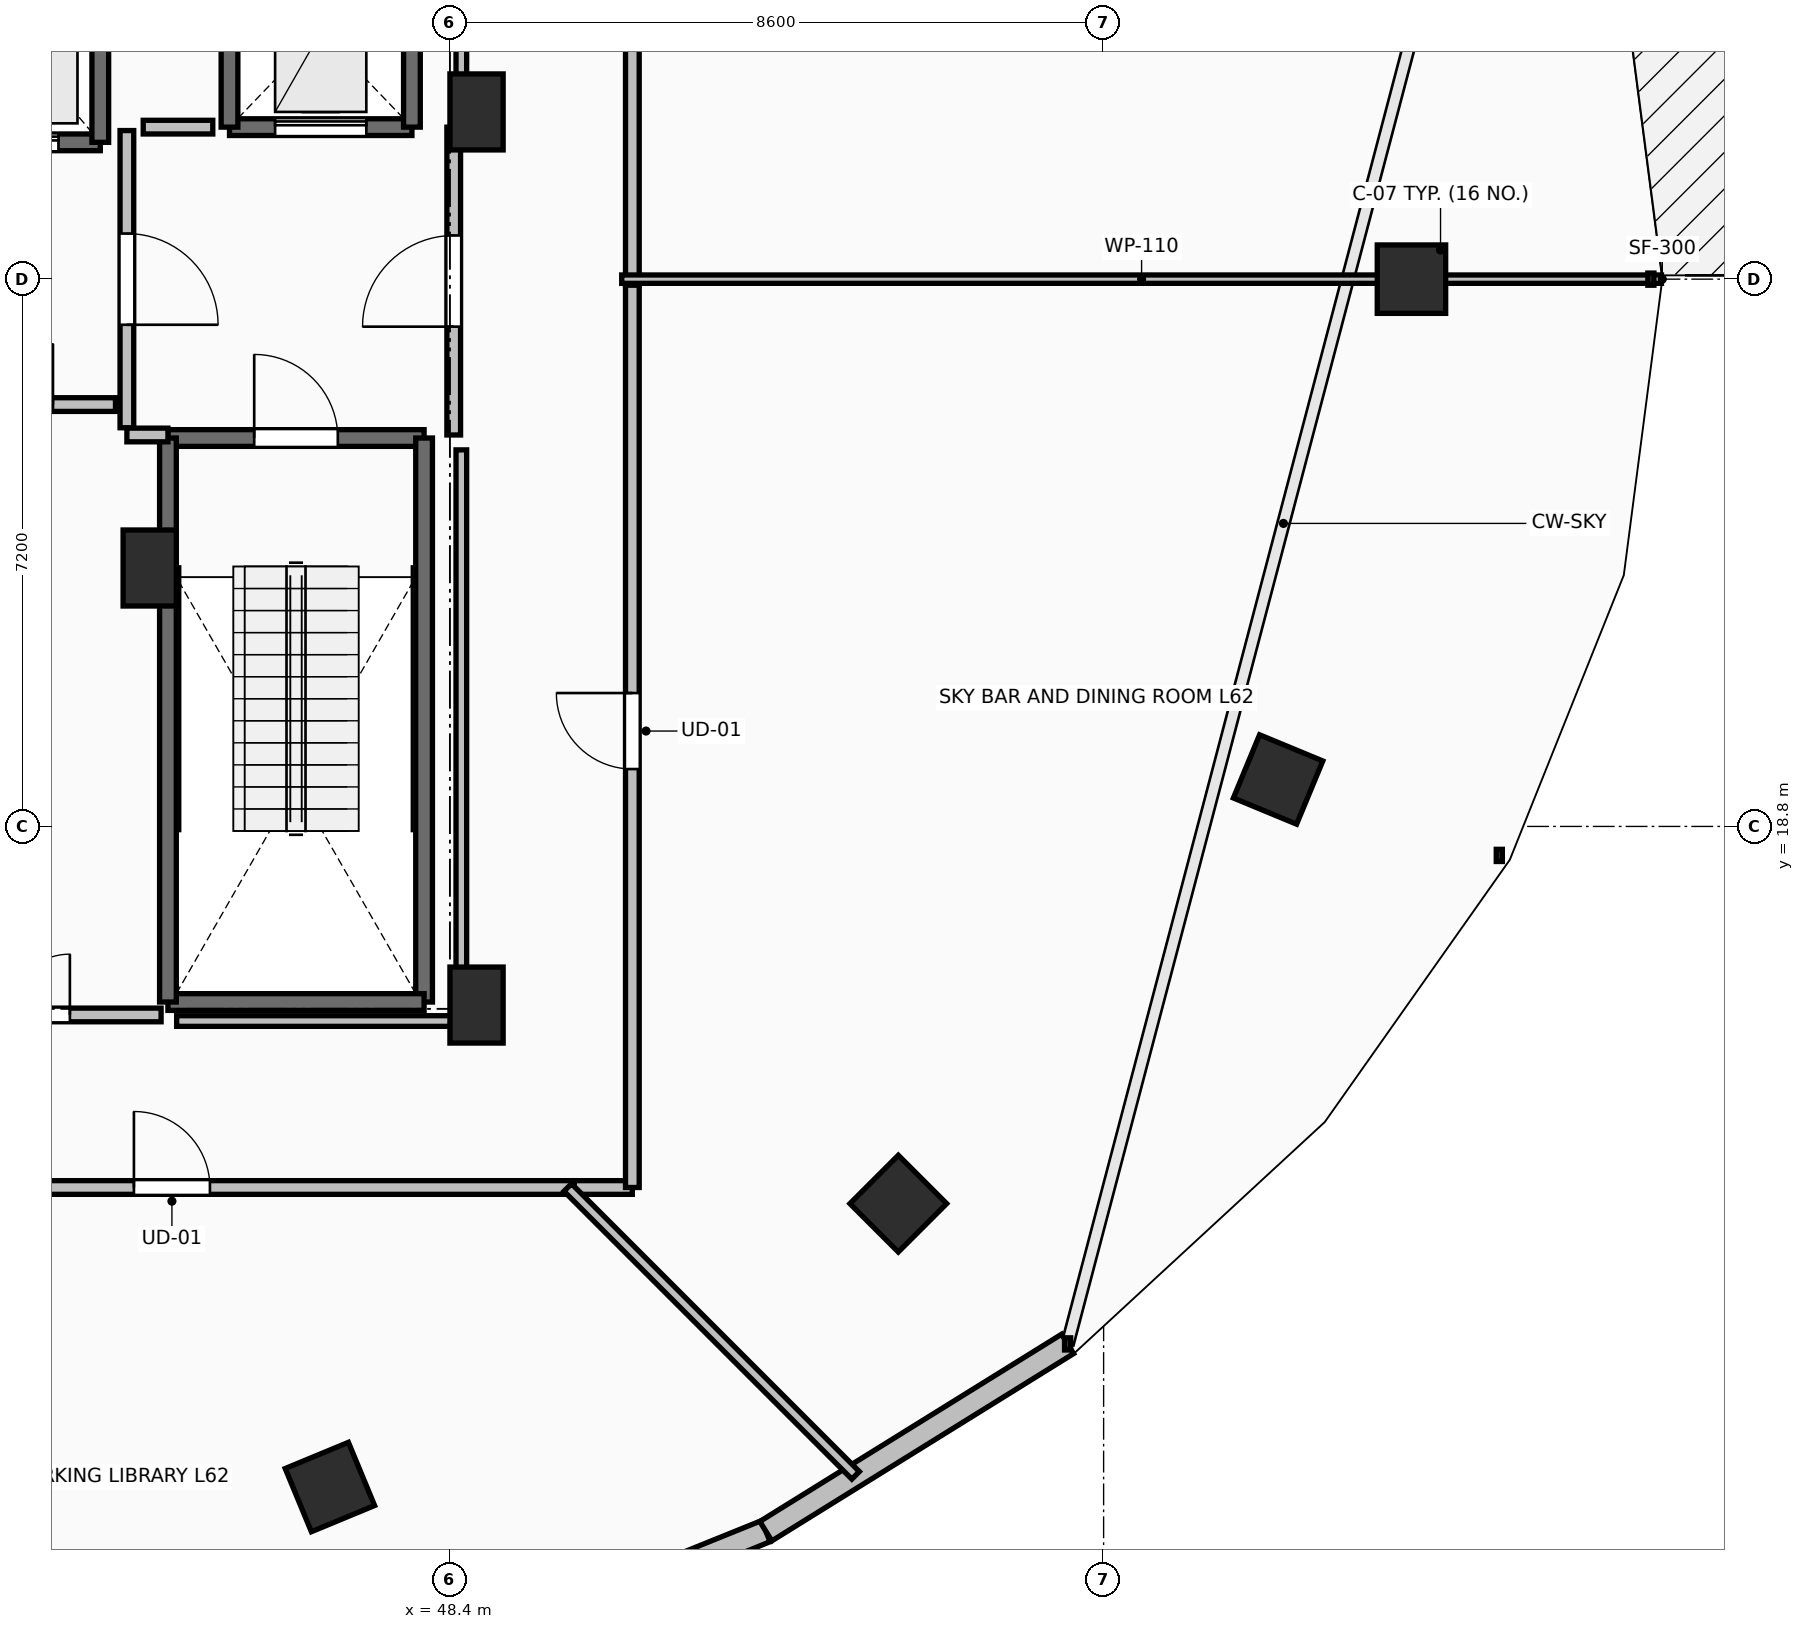
"""IFC4 building model, lengths in metres.
Left out: names, types, materials, properties, quantities, classifications, styles, units other than length and angle.
Written with IfcOpenShell. Run it as: python <this file> out.ifc"""

import sys

from ifc_helpers import new_model, si_unit, direction, frame, frame_2d, origin, origin_2d, place, context, subcontext, project, spatial, rectangle, extrude, element, fill, save


model = new_model("IFC4")
c1 = context("Model", 3, precision=1e-05, world=origin(), true_north=direction((0.0, 1.0)))
c2 = subcontext(c1, "Body", "Model", "MODEL_VIEW")
j1 = project(units=[si_unit("LENGTHUNIT", "METRE"), si_unit("PLANEANGLEUNIT", "RADIAN")], contexts=[c1])
p1 = place(None, origin())
s1 = spatial("IfcSite", under=j1, at=p1, CompositionType="ELEMENT")
p2 = place(p1, origin())
s2 = spatial("IfcBuilding", under=s1, at=p2, CompositionType="ELEMENT")
p3 = place(p2, frame((0.0, 0.0, 229.75)))
s3 = spatial("IfcBuildingStorey", under=s2, at=p3, CompositionType="ELEMENT", Elevation=229.75)
for number, where, z_axis, x_axis in (
    (1, (61.05, 26.0, 0.0), (0.0, 0.0, 1.0), (1.0, 0.0, 0.0)),
    (2, (46.821, 10.109, 0.0), (0.0, 0.0, 1.0), (0.383, -0.924, 0.0)),
    (3, (54.299, 13.838, 0.0), (0.0, 0.0, 1.0), (0.707, -0.707, 0.0)),
    (4, (59.295, 19.418, 0.0), (0.0, 0.0, 1.0), (0.924, -0.383, 0.0)),
):
    element("IfcColumn", number, at=place(p3, frame(where, z_axis=z_axis, x_axis=x_axis)), inside=s3, PredefinedType="COLUMN", context=c2, shape_type="SweptSolid", body=[
        extrude(rectangle(XDim=0.9, YDim=0.9, at=origin_2d()), origin(), (0.0, 0.0, 1.0), 4.5),
    ])
for number, where, z_axis, x_axis in (
    (5, (48.75, 28.2, 0.0), (0.0, 0.0, 1.0), (1.0, 0.0, 0.0)),
    (6, (48.75, 16.45, 0.0), (0.0, 0.0, 1.0), (1.0, 0.0, 0.0)),
    (7, (44.45, 22.2, 0.0), (0.0, 0.0, 1.0), (1.0, 0.0, 0.0)),
):
    element("IfcColumn", number, at=place(p3, frame(where, z_axis=z_axis, x_axis=x_axis)), inside=s3, PredefinedType="PILASTER", context=c2, shape_type="SweptSolid", body=[
        extrude(rectangle(XDim=0.7, YDim=1.0, at=origin_2d()), origin(), (0.0, 0.0, 1.0), 4.5),
    ])
p4 = place(p3, frame((48.026, 7.698, 0.0), z_axis=(0.0, 0.0, 1.0), x_axis=(0.927147375511, 0.374696869594, 0.0)))
e8 = element("IfcWall", 8, at=p4, inside=s3, PredefinedType="STANDARD", context=c2, shape_type="SweptSolid", body=[
    extrude(rectangle(XDim=4.885, YDim=0.3, at=frame_2d((2.443, 0.0))), origin(), (0.0, 0.0, 1.0), 4.24),
])
p5 = place(p3, frame((52.556, 9.529, 0.0), z_axis=(0.0, 0.0, 1.0), x_axis=(0.849702323036, 0.527262707032, 0.0)))
e9 = element("IfcWall", 9, at=p5, inside=s3, PredefinedType="STANDARD", context=c2, shape_type="SweptSolid", body=[
    extrude(rectangle(XDim=4.672, YDim=0.3, at=frame_2d((2.336, 0.0))), origin(), (0.0, 0.0, 1.0), 4.24),
])
p6 = place(p3, frame((44.69, 23.91, 0.0), z_axis=(0.0, 0.0, 1.0), x_axis=(1.0, 0.0, 0.0)))
e10 = element("IfcWall", 10, at=p6, inside=s3, PredefinedType="SOLIDWALL", context=c2, shape_type="SweptSolid", body=[
    extrude(rectangle(XDim=3.37, YDim=0.22, at=frame_2d((1.685, 0.0))), origin(), (0.0, 0.0, 1.0), 4.24),
])
p7 = place(p6, frame((1.135, 0.0, 0.0)))
e11 = element("IfcOpeningElement", 11, at=p7, cuts=e10, PredefinedType="OPENING", context=c2, shape_type="SweptSolid", body=[
    extrude(rectangle(XDim=1.1, YDim=2.15, at=frame_2d((0.55, 1.075))), frame((0.0, 0.125, 0.0), z_axis=(0.0, -1.0, 0.0), x_axis=(1.0, 0.0, 0.0)), (0.0, 0.0, 1.0), 0.25),
])
p8 = place(p3, frame((48.06, 23.91, 0.0), z_axis=(0.0, 0.0, 1.0), x_axis=(0.0, -1.0, 0.0)))
e12 = element("IfcWall", 12, at=p8, inside=s3, PredefinedType="SOLIDWALL", context=c2, shape_type="SweptSolid", body=[
    extrude(rectangle(XDim=7.42, YDim=0.22, at=frame_2d((3.71, 0.0))), origin(), (0.0, 0.0, 1.0), 4.24),
])
p9 = place(p3, frame((48.06, 16.49, 0.0), z_axis=(0.0, 0.0, 1.0), x_axis=(-1.0, 0.0, 0.0)))
e13 = element("IfcWall", 13, at=p9, inside=s3, PredefinedType="SOLIDWALL", context=c2, shape_type="SweptSolid", body=[
    extrude(rectangle(XDim=3.37, YDim=0.22, at=frame_2d((1.685, 0.0))), origin(), (0.0, 0.0, 1.0), 4.24),
])
p10 = place(p3, frame((44.69, 16.49, 0.0), z_axis=(0.0, 0.0, 1.0), x_axis=(0.0, 1.0, 0.0)))
e14 = element("IfcWall", 14, at=p10, inside=s3, PredefinedType="SOLIDWALL", context=c2, shape_type="SweptSolid", body=[
    extrude(rectangle(XDim=7.42, YDim=0.22, at=frame_2d((3.71, 0.0))), origin(), (0.0, 0.0, 1.0), 4.24),
])
p11 = place(p3, frame((41.6, 27.8, 0.0), z_axis=(0.0, 0.0, 1.0), x_axis=(1.0, 0.0, 0.0)))
e15 = element("IfcWall", 15, at=p11, inside=s3, PredefinedType="SOLIDWALL", context=c2, shape_type="SweptSolid", body=[
    extrude(rectangle(XDim=2.2, YDim=0.22, at=frame_2d((1.1, 0.0))), origin(), (0.0, 0.0, 1.0), 4.24),
])
p12 = place(p11, frame((0.55, 0.0, 0.0)))
e16 = element("IfcOpeningElement", 16, at=p12, cuts=e15, PredefinedType="OPENING", context=c2, shape_type="SweptSolid", body=[
    extrude(rectangle(XDim=1.1, YDim=2.2, at=frame_2d((0.55, 1.1))), frame((0.0, 0.125, 0.0), z_axis=(0.0, -1.0, 0.0), x_axis=(1.0, 0.0, 0.0)), (0.0, 0.0, 1.0), 0.25),
])
p13 = place(p3, frame((43.8, 27.8, 0.0), z_axis=(0.0, 0.0, 1.0), x_axis=(0.0, 1.0, 0.0)))
e17 = element("IfcWall", 17, at=p13, inside=s3, PredefinedType="SOLIDWALL", context=c2, shape_type="SweptSolid", body=[
    extrude(rectangle(XDim=2.6, YDim=0.22, at=frame_2d((1.3, 0.0))), origin(), (0.0, 0.0, 1.0), 4.24),
])
p14 = place(p3, frame((45.5, 28.0, 0.0), z_axis=(0.0, 0.0, 1.0), x_axis=(1.0, 0.0, 0.0)))
e18 = element("IfcWall", 18, at=p14, inside=s3, PredefinedType="SHEAR", context=c2, shape_type="SweptSolid", body=[
    extrude(rectangle(XDim=2.4, YDim=0.22, at=frame_2d((1.2, 0.0))), origin(), (0.0, 0.0, 1.0), 4.24),
])
p15 = place(p14, frame((0.6, 0.0, 0.0)))
e19 = element("IfcOpeningElement", 19, at=p15, cuts=e18, PredefinedType="OPENING", context=c2, shape_type="SweptSolid", body=[
    extrude(rectangle(XDim=1.2, YDim=2.2, at=frame_2d((0.6, 1.1))), frame((0.0, 0.125, 0.0), z_axis=(0.0, -1.0, 0.0), x_axis=(1.0, 0.0, 0.0)), (0.0, 0.0, 1.0), 0.25),
])
for number, where, z_axis, x_axis in (
    (20, (47.9, 28.0, 0.0), (0.0, 0.0, 1.0), (0.0, 1.0, 0.0)),
    (21, (45.5, 30.5, 0.0), (0.0, 0.0, 1.0), (0.0, -1.0, 0.0)),
):
    element("IfcWall", number, at=place(p3, frame(where, z_axis=z_axis, x_axis=x_axis)), inside=s3, PredefinedType="SHEAR", context=c2, shape_type="SweptSolid", body=[
        extrude(rectangle(XDim=2.5, YDim=0.22, at=frame_2d((1.25, 0.0))), origin(), (0.0, 0.0, 1.0), 4.24),
    ])
p16 = place(p3, frame((44.15, 27.955, 0.0), z_axis=(0.0, 0.0, 1.0), x_axis=(0.0, -1.0, 0.0)))
e22 = element("IfcWall", 22, at=p16, inside=s3, PredefinedType="PARTITIONING", context=c2, shape_type="SweptSolid", body=[
    extrude(rectangle(XDim=3.91, YDim=0.18, at=frame_2d((1.955, 0.0))), origin(), (0.0, 0.0, 1.0), 4.24),
])
p17 = place(p16, frame((1.355, 0.0, 0.0)))
e23 = element("IfcOpeningElement", 23, at=p17, cuts=e22, PredefinedType="OPENING", context=c2, shape_type="SweptSolid", body=[
    extrude(rectangle(XDim=1.2, YDim=2.15, at=frame_2d((0.6, 1.075))), frame((0.0, 0.105, 0.0), z_axis=(0.0, -1.0, 0.0), x_axis=(1.0, 0.0, 0.0)), (0.0, 0.0, 1.0), 0.21),
])
p18 = place(p3, frame((44.15, 23.95, 0.0), z_axis=(0.0, 0.0, 1.0), x_axis=(1.0, 0.0, 0.0)))
e24 = element("IfcWall", 24, at=p18, inside=s3, PredefinedType="PARTITIONING", context=c2, shape_type="SweptSolid", body=[
    extrude(rectangle(XDim=0.54, YDim=0.18, at=frame_2d((0.27, 0.0))), origin(), (0.0, 0.0, 1.0), 4.24),
])
p19 = place(p3, frame((48.45, 23.95, 0.0), z_axis=(0.0, 0.0, 1.0), x_axis=(0.0, 1.0, 0.0)))
e25 = element("IfcWall", 25, at=p19, inside=s3, PredefinedType="PARTITIONING", context=c2, shape_type="SweptSolid", body=[
    extrude(rectangle(XDim=4.05, YDim=0.18, at=frame_2d((2.025, 0.0))), origin(), (0.0, 0.0, 1.0), 4.24),
])
p20 = place(p19, frame((1.425, 0.0, 0.0)))
e26 = element("IfcOpeningElement", 26, at=p20, cuts=e25, PredefinedType="OPENING", context=c2, shape_type="SweptSolid", body=[
    extrude(rectangle(XDim=1.2, YDim=2.15, at=frame_2d((0.6, 1.075))), frame((0.0, 0.105, 0.0), z_axis=(0.0, -1.0, 0.0), x_axis=(1.0, 0.0, 0.0)), (0.0, 0.0, 1.0), 0.21),
])
p21 = place(p3, frame((41.555, 24.35, 0.0), z_axis=(0.0, 0.0, 1.0), x_axis=(1.0, 0.0, 0.0)))
e27 = element("IfcWall", 27, at=p21, inside=s3, PredefinedType="PARTITIONING", context=c2, shape_type="SweptSolid", body=[
    extrude(rectangle(XDim=2.445, YDim=0.18, at=frame_2d((1.223, 0.0))), origin(), (0.0, 0.0, 1.0), 4.24),
])
p22 = place(p21, frame((0.823, 0.0, 0.0)))
e28 = element("IfcOpeningElement", 28, at=p22, cuts=e27, PredefinedType="OPENING", context=c2, shape_type="SweptSolid", body=[
    extrude(rectangle(XDim=0.8, YDim=2.05, at=frame_2d((0.4, 1.025))), frame((0.0, 0.105, 0.0), z_axis=(0.0, -1.0, 0.0), x_axis=(1.0, 0.0, 0.0)), (0.0, 0.0, 1.0), 0.21),
])
p23 = place(p3, frame((41.4, 16.32, 0.0), z_axis=(0.0, 0.0, 1.0), x_axis=(1.0, 0.0, 0.0)))
e29 = element("IfcWall", 29, at=p23, inside=s3, PredefinedType="PARTITIONING", context=c2, shape_type="SweptSolid", body=[
    extrude(rectangle(XDim=3.2, YDim=0.18, at=frame_2d((1.6, 0.0))), origin(), (0.0, 0.0, 1.0), 4.24),
])
p24 = place(p23, frame((1.2, 0.0, 0.0)))
e30 = element("IfcOpeningElement", 30, at=p24, cuts=e29, PredefinedType="OPENING", context=c2, shape_type="SweptSolid", body=[
    extrude(rectangle(XDim=0.8, YDim=2.05, at=frame_2d((0.4, 1.025))), frame((0.0, 0.105, 0.0), z_axis=(0.0, -1.0, 0.0), x_axis=(1.0, 0.0, 0.0)), (0.0, 0.0, 1.0), 0.21),
])
p25 = place(p3, frame((39.45, 14.05, 0.0), z_axis=(0.0, 0.0, 1.0), x_axis=(1.0, 0.0, 0.0)))
e31 = element("IfcWall", 31, at=p25, inside=s3, PredefinedType="PARTITIONING", context=c2, shape_type="SweptSolid", body=[
    extrude(rectangle(XDim=10.585, YDim=0.18, at=frame_2d((5.292, 0.0))), origin(), (0.0, 0.0, 1.0), 3.432),
])
p26 = place(p25, frame((4.792, 0.0, 0.0)))
e32 = element("IfcOpeningElement", 32, at=p26, cuts=e31, PredefinedType="OPENING", context=c2, shape_type="SweptSolid", body=[
    extrude(rectangle(XDim=1.0, YDim=2.15, at=frame_2d((0.5, 1.075))), frame((0.0, 0.105, 0.0), z_axis=(0.0, -1.0, 0.0), x_axis=(1.0, 0.0, 0.0)), (0.0, 0.0, 1.0), 0.21),
])
p27 = place(p3, frame((50.035, 14.05, 0.0), z_axis=(0.0, 0.0, 1.0), x_axis=(1.0, 0.0, 0.0)))
e33 = element("IfcWall", 33, at=p27, inside=s3, PredefinedType="PARTITIONING", context=c2, shape_type="SweptSolid", body=[
    extrude(rectangle(XDim=0.765, YDim=0.18, at=frame_2d((0.383, 0.0))), origin(), (0.0, 0.0, 1.0), 3.886),
])
p28 = place(p3, frame((50.8, 14.05, 0.0), z_axis=(0.0, 0.0, 1.0), x_axis=(0.0, 1.0, 0.0)))
e34 = element("IfcWall", 34, at=p28, inside=s3, PredefinedType="PARTITIONING", context=c2, shape_type="SweptSolid", body=[
    extrude(rectangle(XDim=12.01, YDim=0.18, at=frame_2d((6.005, 0.0))), origin(), (0.0, 0.0, 1.0), 3.432),
])
p29 = place(p28, frame((5.505, 0.0, 0.0)))
e35 = element("IfcOpeningElement", 35, at=p29, cuts=e34, PredefinedType="OPENING", context=c2, shape_type="SweptSolid", body=[
    extrude(rectangle(XDim=1.0, YDim=2.15, at=frame_2d((0.5, 1.075))), frame((0.0, 0.105, 0.0), z_axis=(0.0, -1.0, 0.0), x_axis=(1.0, 0.0, 0.0)), (0.0, 0.0, 1.0), 0.21),
])
p30 = place(p3, frame((50.8, 25.92, 0.0), z_axis=(0.0, 0.0, 1.0), x_axis=(0.0, 1.0, 0.0)))
e36 = element("IfcWall", 36, at=p30, inside=s3, PredefinedType="PARTITIONING", context=c2, shape_type="SweptSolid", body=[
    extrude(rectangle(XDim=10.17, YDim=0.18, at=frame_2d((5.085, 0.0))), origin(), (0.0, 0.0, 1.0), 3.432),
])
p31 = place(p30, frame((4.585, 0.0, 0.0)))
e37 = element("IfcOpeningElement", 37, at=p31, cuts=e36, PredefinedType="OPENING", context=c2, shape_type="SweptSolid", body=[
    extrude(rectangle(XDim=1.0, YDim=2.15, at=frame_2d((0.5, 1.075))), frame((0.0, 0.105, 0.0), z_axis=(0.0, -1.0, 0.0), x_axis=(1.0, 0.0, 0.0)), (0.0, 0.0, 1.0), 0.21),
])
p32 = place(p3, frame((53.737, 10.263, 0.0), z_axis=(0.0, 0.0, 1.0), x_axis=(-0.707106781187, 0.707106781187, 0.0)))
e38 = element("IfcWall", 38, at=p32, inside=s3, PredefinedType="PARTITIONING", context=c2, shape_type="SweptSolid", body=[
    extrude(rectangle(XDim=5.356, YDim=0.14, at=frame_2d((2.678, 0.0))), origin(), (0.0, 0.0, 1.0), 3.774),
])
p33 = place(p3, frame((64.339, 26.0, 0.0), z_axis=(0.0, 0.0, 1.0), x_axis=(-1.0, 0.0, 0.0)))
e39 = element("IfcWall", 39, at=p33, inside=s3, PredefinedType="PARTITIONING", context=c2, shape_type="SweptSolid", body=[
    extrude(rectangle(XDim=13.679, YDim=0.11, at=frame_2d((6.84, 0.0))), origin(), (0.0, 0.0, 1.0), 3.432),
])
p34 = place(p3, frame((45.28, 28.0, 0.0), z_axis=(0.0, 0.0, 1.0), x_axis=(-1.0, 0.0, 0.0)))
e40 = element("IfcWall", 40, at=p34, inside=s3, PredefinedType="PARTITIONING", context=c2, shape_type="SweptSolid", body=[
    extrude(rectangle(XDim=0.915, YDim=0.18, at=frame_2d((0.458, 0.0))), origin(), (0.0, 0.0, 1.0), 4.24),
])
p35 = place(p3, frame((44.805, 16.24, 0.0), z_axis=(0.0, 0.0, 1.0), x_axis=(1.0, 0.0, 0.0)))
e41 = element("IfcWall", 41, at=p35, inside=s3, PredefinedType="PARTITIONING", context=c2, shape_type="SweptSolid", body=[
    extrude(rectangle(XDim=3.745, YDim=0.14, at=frame_2d((1.873, 0.0))), origin(), (0.0, 0.0, 1.0), 3.432),
])
p36 = place(p3, frame((48.55, 16.24, 0.0), z_axis=(0.0, 0.0, 1.0), x_axis=(0.0, 1.0, 0.0)))
e42 = element("IfcWall", 42, at=p36, inside=s3, PredefinedType="PARTITIONING", context=c2, shape_type="SweptSolid", body=[
    extrude(rectangle(XDim=7.514, YDim=0.14, at=frame_2d((3.757, 0.0))), origin(), (0.0, 0.0, 1.0), 3.432),
])
p37 = place(p3, frame((48.55, 28.196, 0.0), z_axis=(0.0, 0.0, 1.0), x_axis=(0.0, 1.0, 0.0)))
e43 = element("IfcWall", 43, at=p37, inside=s3, PredefinedType="PARTITIONING", context=c2, shape_type="SweptSolid", body=[
    extrude(rectangle(XDim=5.254, YDim=0.14, at=frame_2d((2.627, 0.0))), origin(), (0.0, 0.0, 1.0), 3.432),
])
p38 = place(p7, origin())
e44 = element("IfcDoor", 44, at=p38, inside=s3, OperationType="SINGLE_SWING_LEFT", PredefinedType="DOOR", context=c2, shape_type="SweptSolid", body=[
    extrude(rectangle(XDim=1.1, YDim=2.15, at=frame_2d((0.55, 1.075))), frame((0.0, 0.025, 0.0), z_axis=(0.0, -1.0, 0.0), x_axis=(1.0, 0.0, 0.0)), (0.0, 0.0, 1.0), 0.05),
])
fill(e11, e44)
p39 = place(p12, origin())
e45 = element("IfcDoor", 45, at=p39, inside=s3, OperationType="SLIDING_TO_LEFT", PredefinedType="DOOR", context=c2, shape_type="SweptSolid", body=[
    extrude(rectangle(XDim=1.1, YDim=2.2, at=frame_2d((0.55, 1.1))), frame((0.0, 0.025, 0.0), z_axis=(0.0, -1.0, 0.0), x_axis=(1.0, 0.0, 0.0)), (0.0, 0.0, 1.0), 0.05),
])
fill(e16, e45)
p40 = place(p15, origin())
e46 = element("IfcDoor", 46, at=p40, inside=s3, OperationType="SLIDING_TO_LEFT", PredefinedType="DOOR", context=c2, shape_type="SweptSolid", body=[
    extrude(rectangle(XDim=1.2, YDim=2.2, at=frame_2d((0.6, 1.1))), frame((0.0, 0.025, 0.0), z_axis=(0.0, -1.0, 0.0), x_axis=(1.0, 0.0, 0.0)), (0.0, 0.0, 1.0), 0.05),
])
fill(e19, e46)
p41 = place(p17, origin())
e47 = element("IfcDoor", 47, at=p41, inside=s3, OperationType="SINGLE_SWING_RIGHT", PredefinedType="DOOR", context=c2, shape_type="SweptSolid", body=[
    extrude(rectangle(XDim=1.2, YDim=2.15, at=frame_2d((0.6, 1.075))), frame((0.0, 0.025, 0.0), z_axis=(0.0, -1.0, 0.0), x_axis=(1.0, 0.0, 0.0)), (0.0, 0.0, 1.0), 0.05),
])
fill(e23, e47)
p42 = place(p20, origin())
e48 = element("IfcDoor", 48, at=p42, inside=s3, OperationType="SINGLE_SWING_LEFT", PredefinedType="DOOR", context=c2, shape_type="SweptSolid", body=[
    extrude(rectangle(XDim=1.2, YDim=2.15, at=frame_2d((0.6, 1.075))), frame((0.0, 0.025, 0.0), z_axis=(0.0, -1.0, 0.0), x_axis=(1.0, 0.0, 0.0)), (0.0, 0.0, 1.0), 0.05),
])
fill(e26, e48)
p43 = place(p22, origin())
e49 = element("IfcDoor", 49, at=p43, inside=s3, OperationType="SINGLE_SWING_RIGHT", PredefinedType="DOOR", context=c2, shape_type="SweptSolid", body=[
    extrude(rectangle(XDim=0.8, YDim=2.05, at=frame_2d((0.4, 1.025))), frame((0.0, 0.025, 0.0), z_axis=(0.0, -1.0, 0.0), x_axis=(1.0, 0.0, 0.0)), (0.0, 0.0, 1.0), 0.05),
])
fill(e28, e49)
p44 = place(p24, origin())
e50 = element("IfcDoor", 50, at=p44, inside=s3, OperationType="SINGLE_SWING_RIGHT", PredefinedType="DOOR", context=c2, shape_type="SweptSolid", body=[
    extrude(rectangle(XDim=0.8, YDim=2.05, at=frame_2d((0.4, 1.025))), frame((0.0, 0.025, 0.0), z_axis=(0.0, -1.0, 0.0), x_axis=(1.0, 0.0, 0.0)), (0.0, 0.0, 1.0), 0.05),
])
fill(e30, e50)
p45 = place(p26, origin())
e51 = element("IfcDoor", 51, at=p45, inside=s3, OperationType="SINGLE_SWING_LEFT", PredefinedType="DOOR", context=c2, shape_type="SweptSolid", body=[
    extrude(rectangle(XDim=1.0, YDim=2.15, at=frame_2d((0.5, 1.075))), frame((0.0, 0.025, 0.0), z_axis=(0.0, -1.0, 0.0), x_axis=(1.0, 0.0, 0.0)), (0.0, 0.0, 1.0), 0.05),
])
fill(e32, e51)
p46 = place(p29, origin())
e52 = element("IfcDoor", 52, at=p46, inside=s3, OperationType="SINGLE_SWING_RIGHT", PredefinedType="DOOR", context=c2, shape_type="SweptSolid", body=[
    extrude(rectangle(XDim=1.0, YDim=2.15, at=frame_2d((0.5, 1.075))), frame((0.0, 0.025, 0.0), z_axis=(0.0, -1.0, 0.0), x_axis=(1.0, 0.0, 0.0)), (0.0, 0.0, 1.0), 0.05),
])
fill(e35, e52)
save(model, sys.argv[1])
